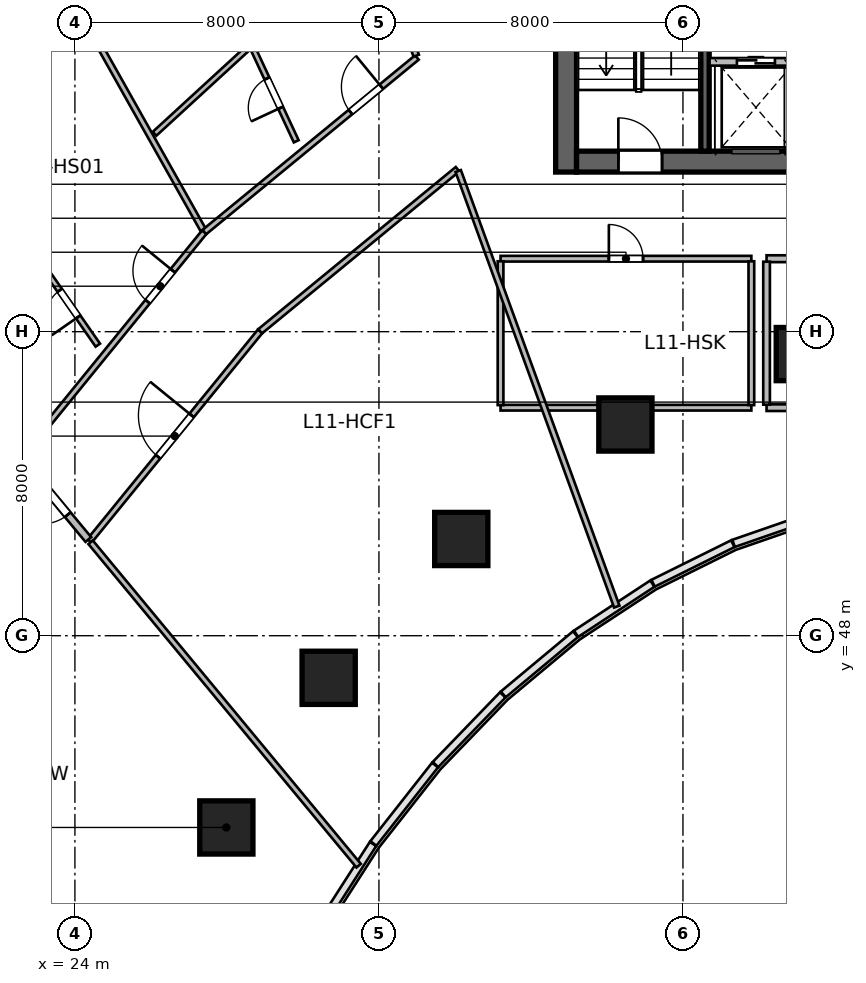
"""IFC4 building model, lengths in metres.
Left out: names, types, materials, properties, quantities, classifications, styles, units other than length and angle.
Written with IfcOpenShell. Run it as: python <this file> out.ifc"""

import sys

from ifc_helpers import new_model, si_unit, direction, frame, frame_2d, origin, origin_2d, place, context, subcontext, project, spatial, rectangle, circle, extrude, source, transform, mapped, element, fill, save


model = new_model("IFC4")
c1 = context("Model", 3, precision=1e-05, world=origin(), true_north=direction((0.0, 1.0)))
c2 = subcontext(c1, "Body", "Model", "MODEL_VIEW")
j1 = project(units=[si_unit("LENGTHUNIT", "METRE"), si_unit("PLANEANGLEUNIT", "RADIAN")], contexts=[c1])
p1 = place(None, origin())
s1 = spatial("IfcSite", under=j1, at=p1, CompositionType="ELEMENT")
p2 = place(p1, origin())
s2 = spatial("IfcBuilding", under=s1, at=p2, CompositionType="ELEMENT")
p3 = place(p2, frame((0.0, 0.0, 53.4)))
s3 = spatial("IfcBuildingStorey", under=s2, at=p3, CompositionType="ELEMENT", Elevation=53.4)
m1 = source(origin(), c2, "Body", "SweptSolid", [
    extrude(rectangle(XDim=12.0, YDim=0.55, at=frame_2d((6.0, 0.0))), origin(), (0.0, 0.0, 1.0), 3.6),
])
p4 = place(p3, frame((36.925, 60.2, 0.0), z_axis=(0.0, 0.0, 1.0), x_axis=(0.0, 1.0, 0.0)))
e1 = element("IfcWall", 1, at=p4, inside=s3, PredefinedType="SHEAR", context=c2, shape_type="MappedRepresentation", body=[
    mapped(m1, transform((0.0, 0.0, 0.0), scale=1.0)),
])
m2 = source(origin(), c2, "Body", "SweptSolid", [
    extrude(rectangle(XDim=21.6, YDim=0.55, at=frame_2d((10.8, 0.0))), origin(), (0.0, 0.0, 1.0), 3.6),
])
p5 = place(p3, frame((37.2, 60.475, 0.0), z_axis=(0.0, 0.0, 1.0), x_axis=(1.0, 0.0, 0.0)))
e2 = element("IfcWall", 2, at=p5, inside=s3, PredefinedType="SHEAR", context=c2, shape_type="MappedRepresentation", body=[
    mapped(m2, transform((0.0, 0.0, 0.0), scale=1.0)),
])
p6 = place(p5, frame((1.1, 0.0, 0.0)))
e3 = element("IfcOpeningElement", 3, at=p6, cuts=e2, PredefinedType="OPENING", context=c2, shape_type="SweptSolid", body=[
    extrude(rectangle(XDim=1.15, YDim=2.15, at=frame_2d((0.575, 1.075))), frame((0.0, 0.285, 0.0), z_axis=(0.0, -1.0, 0.0), x_axis=(1.0, 0.0, 0.0)), (0.0, 0.0, 1.0), 0.57),
])
p7 = place(p5, frame((19.5, 0.0, 0.0)))
e4 = element("IfcOpeningElement", 4, at=p7, cuts=e2, PredefinedType="OPENING", context=c2, shape_type="SweptSolid", body=[
    extrude(rectangle(XDim=0.9, YDim=2.1, at=frame_2d((0.45, 1.05))), frame((0.0, 0.285, 0.0), z_axis=(0.0, -1.0, 0.0), x_axis=(1.0, 0.0, 0.0)), (0.0, 0.0, 1.0), 0.57),
])
p8 = place(p5, frame((12.02, 0.0, 0.0)))
e5 = element("IfcOpeningElement", 5, at=p8, cuts=e2, PredefinedType="OPENING", context=c2, shape_type="SweptSolid", body=[
    extrude(rectangle(XDim=1.6, YDim=2.15, at=frame_2d((0.8, 1.075))), frame((0.0, 0.285, 0.0), z_axis=(0.0, -1.0, 0.0), x_axis=(1.0, 0.0, 0.0)), (0.0, 0.0, 1.0), 0.57),
])
m3 = source(origin(), c2, "Body", "SweptSolid", [
    extrude(rectangle(XDim=10.9, YDim=0.22, at=frame_2d((5.45, 0.0))), origin(), (0.0, 0.0, 1.0), 3.6),
])
p9 = place(p3, frame((40.58, 60.75, 0.0), z_axis=(0.0, 0.0, 1.0), x_axis=(0.0, 1.0, 0.0)))
e6 = element("IfcWall", 6, at=p9, inside=s3, PredefinedType="SHEAR", context=c2, shape_type="MappedRepresentation", body=[
    mapped(m3, transform((0.0, 0.0, 0.0), scale=1.0)),
])
m4 = source(origin(), c2, "Body", "SweptSolid", [
    extrude(circle(Radius=0.7, at=origin_2d()), origin(), (0.0, 0.0, 1.0), 3.6),
])
for number, where, z_axis, x_axis in (
    (7, (27.985, 42.955, 0.0), (0.0, 0.0, 1.0), (-0.691, 0.723, 0.0)),
    (8, (30.677, 46.892, 0.0), (0.0, 0.0, 1.0), (-0.571, 0.821, 0.0)),
    (9, (34.166, 50.545, 0.0), (0.0, 0.0, 1.0), (-0.436, 0.9, 0.0)),
    (10, (38.485, 53.558, 0.0), (0.0, 0.0, 1.0), (-0.289, 0.957, 0.0)),
    (11, (43.154, 55.411, 0.0), (0.0, 0.0, 1.0), (-0.143, 0.99, 0.0)),
):
    element("IfcColumn", number, at=place(p3, frame(where, z_axis=z_axis, x_axis=x_axis)), inside=s3, PredefinedType="COLUMN", context=c2, shape_type="MappedRepresentation", body=[
        mapped(m4, transform((0.0, 0.0, 0.0), scale=1.0)),
    ])
m5 = source(origin(), c2, "Body", "SweptSolid", [
    extrude(rectangle(XDim=8.02, YDim=0.2, at=frame_2d((4.01, 0.0))), origin(), (0.0, 0.0, 1.0), 3.36),
])
p10 = place(p3, frame((40.7, 63.1, 0.0), z_axis=(0.0, 0.0, 1.0), x_axis=(1.0, 0.0, 0.0)))
e12 = element("IfcWall", 12, at=p10, inside=s3, PredefinedType="SOLIDWALL", context=c2, shape_type="MappedRepresentation", body=[
    mapped(m5, transform((0.0, 0.0, 0.0), scale=1.0)),
])
p11 = place(p10, frame((0.72, 0.0, 0.0)))
e13 = element("IfcOpeningElement", 13, at=p11, cuts=e12, PredefinedType="OPENING", context=c2, shape_type="SweptSolid", body=[
    extrude(rectangle(XDim=1.0, YDim=2.15, at=frame_2d((0.5, 1.075))), frame((0.0, 0.11, 0.0), z_axis=(0.0, -1.0, 0.0), x_axis=(1.0, 0.0, 0.0)), (0.0, 0.0, 1.0), 0.22),
])
p12 = place(p10, frame((2.62, 0.0, 0.0)))
e14 = element("IfcOpeningElement", 14, at=p12, cuts=e12, PredefinedType="OPENING", context=c2, shape_type="SweptSolid", body=[
    extrude(rectangle(XDim=1.0, YDim=2.15, at=frame_2d((0.5, 1.075))), frame((0.0, 0.11, 0.0), z_axis=(0.0, -1.0, 0.0), x_axis=(1.0, 0.0, 0.0)), (0.0, 0.0, 1.0), 0.22),
])
p13 = place(p10, frame((4.55, 0.0, 0.0)))
e15 = element("IfcOpeningElement", 15, at=p13, cuts=e12, PredefinedType="OPENING", context=c2, shape_type="SweptSolid", body=[
    extrude(rectangle(XDim=1.0, YDim=2.15, at=frame_2d((0.5, 1.075))), frame((0.0, 0.11, 0.0), z_axis=(0.0, -1.0, 0.0), x_axis=(1.0, 0.0, 0.0)), (0.0, 0.0, 1.0), 0.22),
])
p14 = place(p10, frame((6.55, 0.0, 0.0)))
e16 = element("IfcOpeningElement", 16, at=p14, cuts=e12, PredefinedType="OPENING", context=c2, shape_type="SweptSolid", body=[
    extrude(rectangle(XDim=1.0, YDim=2.15, at=frame_2d((0.5, 1.075))), frame((0.0, 0.11, 0.0), z_axis=(0.0, -1.0, 0.0), x_axis=(1.0, 0.0, 0.0)), (0.0, 0.0, 1.0), 0.22),
])
m6 = source(origin(), c2, "Body", "SweptSolid", [
    extrude(rectangle(XDim=6.6, YDim=0.15, at=frame_2d((3.3, 0.0))), origin(), (0.0, 0.0, 1.0), 2.803),
])
p15 = place(p3, frame((35.2, 54.0, 0.0), z_axis=(0.0, 0.0, 1.0), x_axis=(1.0, 0.0, 0.0)))
e17 = element("IfcWall", 17, at=p15, inside=s3, PredefinedType="PARTITIONING", context=c2, shape_type="MappedRepresentation", body=[
    mapped(m6, transform((0.0, 0.0, 0.0), scale=1.0)),
])
m7 = source(origin(), c2, "Body", "SweptSolid", [
    extrude(rectangle(XDim=6.6, YDim=0.15, at=frame_2d((3.3, 0.0))), origin(), (0.0, 0.0, 1.0), 3.36),
])
p16 = place(p3, frame((35.2, 57.92, 0.0), z_axis=(0.0, 0.0, 1.0), x_axis=(1.0, 0.0, 0.0)))
e18 = element("IfcWall", 18, at=p16, inside=s3, PredefinedType="PARTITIONING", context=c2, shape_type="MappedRepresentation", body=[
    mapped(m7, transform((0.0, 0.0, 0.0), scale=1.0)),
])
p17 = place(p16, frame((2.85, 0.0, 0.0)))
e19 = element("IfcOpeningElement", 19, at=p17, cuts=e18, PredefinedType="OPENING", context=c2, shape_type="SweptSolid", body=[
    extrude(rectangle(XDim=0.9, YDim=2.1, at=frame_2d((0.45, 1.05))), frame((0.0, 0.085, 0.0), z_axis=(0.0, -1.0, 0.0), x_axis=(1.0, 0.0, 0.0)), (0.0, 0.0, 1.0), 0.17),
])
m8 = source(origin(), c2, "Body", "SweptSolid", [
    extrude(rectangle(XDim=3.785, YDim=0.15, at=frame_2d((1.893, 0.0))), origin(), (0.0, 0.0, 1.0), 3.36),
])
for number, where, z_axis, x_axis in (
    (20, (35.2, 54.067, 0.0), (0.0, 0.0, 1.0), (0.0, 1.0, 0.0)),
    (21, (41.8, 54.067, 0.0), (0.0, 0.0, 1.0), (0.0, 1.0, 0.0)),
):
    element("IfcWall", number, at=place(p3, frame(where, z_axis=z_axis, x_axis=x_axis)), inside=s3, PredefinedType="PARTITIONING", context=c2, shape_type="MappedRepresentation", body=[
        mapped(m8, transform((0.0, 0.0, 0.0), scale=1.0)),
    ])
m9 = source(origin(), c2, "Body", "SweptSolid", [
    extrude(rectangle(XDim=4.176, YDim=0.175, at=frame_2d((2.088, 0.0))), origin(), (0.0, 0.0, 1.0), 3.36),
])
p18 = place(p3, frame((42.2, 54.0, 0.0), z_axis=(0.0, 0.0, 1.0), x_axis=(1.0, 0.0, 0.0)))
e22 = element("IfcWall", 22, at=p18, inside=s3, PredefinedType="PARTITIONING", context=c2, shape_type="MappedRepresentation", body=[
    mapped(m9, transform((0.0, 0.0, 0.0), scale=1.0)),
])
m10 = source(origin(), c2, "Body", "SweptSolid", [
    extrude(rectangle(XDim=4.176, YDim=0.18, at=frame_2d((2.088, 0.0))), origin(), (0.0, 0.0, 1.0), 3.36),
])
p19 = place(p3, frame((42.2, 57.92, 0.0), z_axis=(0.0, 0.0, 1.0), x_axis=(1.0, 0.0, 0.0)))
e23 = element("IfcWall", 23, at=p19, inside=s3, PredefinedType="PLUMBINGWALL", context=c2, shape_type="MappedRepresentation", body=[
    mapped(m10, transform((0.0, 0.0, 0.0), scale=1.0)),
])
p20 = place(p19, frame((1.638, 0.0, 0.0)))
e24 = element("IfcOpeningElement", 24, at=p20, cuts=e23, PredefinedType="OPENING", context=c2, shape_type="SweptSolid", body=[
    extrude(rectangle(XDim=0.9, YDim=2.08, at=frame_2d((0.45, 1.04))), frame((0.0, 0.1, 0.0), z_axis=(0.0, -1.0, 0.0), x_axis=(1.0, 0.0, 0.0)), (0.0, 0.0, 1.0), 0.2),
])
m11 = source(origin(), c2, "Body", "SweptSolid", [
    extrude(rectangle(XDim=3.763, YDim=0.175, at=frame_2d((1.881, 0.0))), origin(), (0.0, 0.0, 1.0), 3.36),
])
p21 = place(p3, frame((42.2, 54.079, 0.0), z_axis=(0.0, 0.0, 1.0), x_axis=(0.0, 1.0, 0.0)))
e25 = element("IfcWall", 25, at=p21, inside=s3, PredefinedType="PARTITIONING", context=c2, shape_type="MappedRepresentation", body=[
    mapped(m11, transform((0.0, 0.0, 0.0), scale=1.0)),
])
m12 = source(origin(), c2, "Body", "SweptSolid", [
    extrude(rectangle(XDim=7.659, YDim=0.15, at=frame_2d((3.829, 0.0))), origin(), (0.0, 0.0, 1.0), 3.36),
])
p22 = place(p3, frame((22.57, 52.683, 0.0), z_axis=(0.0, 0.0, 1.0), x_axis=(0.631489868862, 0.775384127723, 0.0)))
e26 = element("IfcWall", 26, at=p22, inside=s3, PredefinedType="PARTITIONING", context=c2, shape_type="MappedRepresentation", body=[
    mapped(m12, transform((0.0, 0.0, 0.0), scale=1.0)),
])
p23 = place(p22, frame((5.295, 0.0, 0.0)))
e27 = element("IfcOpeningElement", 27, at=p23, cuts=e26, PredefinedType="OPENING", context=c2, shape_type="SweptSolid", body=[
    extrude(rectangle(XDim=1.05, YDim=2.15, at=frame_2d((0.525, 1.075))), frame((0.0, 0.085, 0.0), z_axis=(0.0, -1.0, 0.0), x_axis=(1.0, 0.0, 0.0)), (0.0, 0.0, 1.0), 0.17),
])
m13 = source(origin(), c2, "Body", "SweptSolid", [
    extrude(rectangle(XDim=11.573, YDim=0.15, at=frame_2d((5.786, 0.0))), origin(), (0.0, 0.0, 1.0), 3.36),
])
p24 = place(p3, frame((27.382, 58.664, 0.0), z_axis=(0.0, 0.0, 1.0), x_axis=(-0.490161073951, 0.871631872744, 0.0)))
e28 = element("IfcWall", 28, at=p24, inside=s3, PredefinedType="PARTITIONING", context=c2, shape_type="MappedRepresentation", body=[
    mapped(m13, transform((0.0, 0.0, 0.0), scale=1.0)),
])
m14 = source(origin(), c2, "Body", "SweptSolid", [
    extrude(rectangle(XDim=2.663, YDim=0.14, at=frame_2d((1.332, 0.0))), origin(), (0.0, 0.0, 1.0), 2.644),
])
p25 = place(p3, frame((24.603, 55.645, 0.0), z_axis=(0.0, 0.0, 1.0), x_axis=(-0.570905989724, 0.821015438891, 0.0)))
e29 = element("IfcWall", 29, at=p25, inside=s3, PredefinedType="PARTITIONING", context=c2, shape_type="MappedRepresentation", body=[
    mapped(m14, transform((0.0, 0.0, 0.0), scale=1.0)),
])
p26 = place(p25, frame((0.906, 0.0, 0.0)))
e30 = element("IfcOpeningElement", 30, at=p26, cuts=e29, PredefinedType="OPENING", context=c2, shape_type="SweptSolid", body=[
    extrude(rectangle(XDim=0.85, YDim=2.05, at=frame_2d((0.425, 1.025))), frame((0.0, 0.08, 0.0), z_axis=(0.0, -1.0, 0.0), x_axis=(1.0, 0.0, 0.0)), (0.0, 0.0, 1.0), 0.16),
])
m15 = source(origin(), c2, "Body", "SweptSolid", [
    extrude(rectangle(XDim=7.237, YDim=0.15, at=frame_2d((3.618, 0.0))), origin(), (0.0, 0.0, 1.0), 3.36),
])
p27 = place(p3, frame((27.406, 58.621, 0.0), z_axis=(0.0, 0.0, 1.0), x_axis=(0.772813707793, 0.634632943557, 0.0)))
e31 = element("IfcWall", 31, at=p27, inside=s3, PredefinedType="PARTITIONING", context=c2, shape_type="MappedRepresentation", body=[
    mapped(m15, transform((0.0, 0.0, 0.0), scale=1.0)),
])
p28 = place(p27, frame((4.975, 0.0, 0.0)))
e32 = element("IfcOpeningElement", 32, at=p28, cuts=e31, PredefinedType="OPENING", context=c2, shape_type="SweptSolid", body=[
    extrude(rectangle(XDim=1.05, YDim=2.15, at=frame_2d((0.525, 1.075))), frame((0.0, 0.085, 0.0), z_axis=(0.0, -1.0, 0.0), x_axis=(1.0, 0.0, 0.0)), (0.0, 0.0, 1.0), 0.17),
])
m16 = source(origin(), c2, "Body", "SweptSolid", [
    extrude(rectangle(XDim=12.088, YDim=0.15, at=frame_2d((6.044, 0.0))), origin(), (0.0, 0.0, 1.0), 3.36),
])
p29 = place(p3, frame((32.981, 63.262, 0.0), z_axis=(0.0, 0.0, 1.0), x_axis=(-0.34203007529, 0.939689005787, 0.0)))
e33 = element("IfcWall", 33, at=p29, inside=s3, PredefinedType="PARTITIONING", context=c2, shape_type="MappedRepresentation", body=[
    mapped(m16, transform((0.0, 0.0, 0.0), scale=1.0)),
])
m17 = source(origin(), c2, "Body", "SweptSolid", [
    extrude(rectangle(XDim=3.456, YDim=0.14, at=frame_2d((1.728, 0.0))), origin(), (0.0, 0.0, 1.0), 3.36),
])
p30 = place(p3, frame((26.095, 61.207, 0.0), z_axis=(0.0, 0.0, 1.0), x_axis=(0.736860870293, 0.676044420013, 0.0)))
e34 = element("IfcWall", 34, at=p30, inside=s3, PredefinedType="PARTITIONING", context=c2, shape_type="MappedRepresentation", body=[
    mapped(m17, transform((0.0, 0.0, 0.0), scale=1.0)),
])
m18 = source(origin(), c2, "Body", "SweptSolid", [
    extrude(rectangle(XDim=2.796, YDim=0.14, at=frame_2d((1.398, 0.0))), origin(), (0.0, 0.0, 1.0), 3.36),
])
p31 = place(p3, frame((29.823, 61.009, 0.0), z_axis=(0.0, 0.0, 1.0), x_axis=(-0.422316594955, 0.906448395456, 0.0)))
e35 = element("IfcWall", 35, at=p31, inside=s3, PredefinedType="PARTITIONING", context=c2, shape_type="MappedRepresentation", body=[
    mapped(m18, transform((0.0, 0.0, 0.0), scale=1.0)),
])
p32 = place(p31, frame((0.973, 0.0, 0.0)))
e36 = element("IfcOpeningElement", 36, at=p32, cuts=e35, PredefinedType="OPENING", context=c2, shape_type="SweptSolid", body=[
    extrude(rectangle(XDim=0.85, YDim=2.05, at=frame_2d((0.425, 1.025))), frame((0.0, 0.08, 0.0), z_axis=(0.0, -1.0, 0.0), x_axis=(1.0, 0.0, 0.0)), (0.0, 0.0, 1.0), 0.16),
])
m19 = source(origin(), c2, "Body", "SweptSolid", [
    extrude(rectangle(XDim=7.113, YDim=0.15, at=frame_2d((3.556, 0.0))), origin(), (0.0, 0.0, 1.0), 3.36),
])
p33 = place(p3, frame((24.383, 50.495, 0.0), z_axis=(0.0, 0.0, 1.0), x_axis=(0.63149032532, 0.775383755974, 0.0)))
e37 = element("IfcWall", 37, at=p33, inside=s3, PredefinedType="PARTITIONING", context=c2, shape_type="MappedRepresentation", body=[
    mapped(m19, transform((0.0, 0.0, 0.0), scale=1.0)),
])
p34 = place(p33, frame((2.856, 0.0, 0.0)))
e38 = element("IfcOpeningElement", 38, at=p34, cuts=e37, PredefinedType="OPENING", context=c2, shape_type="SweptSolid", body=[
    extrude(rectangle(XDim=1.4, YDim=2.15, at=frame_2d((0.7, 1.075))), frame((0.0, 0.085, 0.0), z_axis=(0.0, -1.0, 0.0), x_axis=(1.0, 0.0, 0.0)), (0.0, 0.0, 1.0), 0.17),
])
m20 = source(origin(), c2, "Body", "SweptSolid", [
    extrude(rectangle(XDim=6.721, YDim=0.15, at=frame_2d((3.361, 0.0))), origin(), (0.0, 0.0, 1.0), 3.36),
])
p35 = place(p3, frame((28.874, 56.01, 0.0), z_axis=(0.0, 0.0, 1.0), x_axis=(0.772828051199, 0.63461547671, 0.0)))
e39 = element("IfcWall", 39, at=p35, inside=s3, PredefinedType="PARTITIONING", context=c2, shape_type="MappedRepresentation", body=[
    mapped(m20, transform((0.0, 0.0, 0.0), scale=1.0)),
])
m21 = source(origin(), c2, "Body", "SweptSolid", [
    extrude(rectangle(XDim=11.053, YDim=0.15, at=frame_2d((5.527, 0.0))), origin(), (0.0, 0.0, 1.0), 3.36),
])
p36 = place(p3, frame((31.466, 41.949, 0.0), z_axis=(0.0, 0.0, 1.0), x_axis=(-0.638131235571, 0.769927611005, 0.0)))
e40 = element("IfcWall", 40, at=p36, inside=s3, PredefinedType="PARTITIONING", context=c2, shape_type="MappedRepresentation", body=[
    mapped(m21, transform((0.0, 0.0, 0.0), scale=1.0)),
])
m22 = source(origin(), c2, "Body", "SweptSolid", [
    extrude(rectangle(XDim=12.196, YDim=0.15, at=frame_2d((6.098, 0.0))), origin(), (0.0, 0.0, 1.0), 3.36),
])
p37 = place(p3, frame((38.258, 48.766, 0.0), z_axis=(0.0, 0.0, 1.0), x_axis=(-0.342022711534, 0.939691686031, 0.0)))
e41 = element("IfcWall", 41, at=p37, inside=s3, PredefinedType="PARTITIONING", context=c2, shape_type="MappedRepresentation", body=[
    mapped(m22, transform((0.0, 0.0, 0.0), scale=1.0)),
])
m23 = source(origin(), c2, "Body", "SweptSolid", [
    extrude(rectangle(XDim=2.748, YDim=0.195, at=frame_2d((1.374, 0.0))), origin(), (0.0, 0.0, 1.0), 3.36),
])
p38 = place(p3, frame((24.353, 50.531, 0.0), z_axis=(0.0, 0.0, 1.0), x_axis=(-0.638111168284, 0.769944242729, 0.0)))
e42 = element("IfcWall", 42, at=p38, inside=s3, PredefinedType="PARTITIONING", context=c2, shape_type="MappedRepresentation", body=[
    mapped(m23, transform((0.0, 0.0, 0.0), scale=1.0)),
])
p39 = place(p38, frame((0.849, 0.0, 0.0)))
e43 = element("IfcOpeningElement", 43, at=p39, cuts=e42, PredefinedType="OPENING", context=c2, shape_type="SweptSolid", body=[
    extrude(rectangle(XDim=1.05, YDim=2.15, at=frame_2d((0.525, 1.075))), frame((0.0, 0.107, 0.0), z_axis=(0.0, -1.0, 0.0), x_axis=(1.0, 0.0, 0.0)), (0.0, 0.0, 1.0), 0.215),
])
m24 = source(origin(), c2, "Body", "SweptSolid", [
    extrude(rectangle(XDim=1.15, YDim=2.15, at=frame_2d((0.575, 1.075))), frame((0.0, 0.025, 0.0), z_axis=(0.0, -1.0, 0.0), x_axis=(1.0, 0.0, 0.0)), (0.0, 0.0, 1.0), 0.05),
])
p40 = place(p6, origin())
e44 = element("IfcDoor", 44, at=p40, inside=s3, OperationType="SINGLE_SWING_LEFT", PredefinedType="DOOR", context=c2, shape_type="MappedRepresentation", body=[
    mapped(m24, transform((0.0, 0.0, 0.0), scale=1.0)),
])
fill(e3, e44)
m25 = source(origin(), c2, "Body", "SweptSolid", [
    extrude(rectangle(XDim=1.0, YDim=2.15, at=frame_2d((0.5, 1.075))), frame((0.0, 0.025, 0.0), z_axis=(0.0, -1.0, 0.0), x_axis=(1.0, 0.0, 0.0)), (0.0, 0.0, 1.0), 0.05),
])
p41 = place(p11, origin())
e45 = element("IfcDoor", 45, at=p41, inside=s3, OperationType="DOUBLE_DOOR_SLIDING", PredefinedType="DOOR", context=c2, shape_type="MappedRepresentation", body=[
    mapped(m25, transform((0.0, 0.0, 0.0), scale=1.0)),
])
fill(e13, e45)
m26 = source(origin(), c2, "Body", "SweptSolid", [
    extrude(rectangle(XDim=0.9, YDim=2.1, at=frame_2d((0.45, 1.05))), frame((0.0, 0.025, 0.0), z_axis=(0.0, -1.0, 0.0), x_axis=(1.0, 0.0, 0.0)), (0.0, 0.0, 1.0), 0.05),
])
p42 = place(p17, origin())
e46 = element("IfcDoor", 46, at=p42, inside=s3, OperationType="SINGLE_SWING_LEFT", PredefinedType="DOOR", context=c2, shape_type="MappedRepresentation", body=[
    mapped(m26, transform((0.0, 0.0, 0.0), scale=1.0)),
])
fill(e19, e46)
m27 = source(origin(), c2, "Body", "SweptSolid", [
    extrude(rectangle(XDim=1.05, YDim=2.15, at=frame_2d((0.525, 1.075))), frame((0.0, 0.025, 0.0), z_axis=(0.0, -1.0, 0.0), x_axis=(1.0, 0.0, 0.0)), (0.0, 0.0, 1.0), 0.05),
])
p43 = place(p23, origin())
e47 = element("IfcDoor", 47, at=p43, inside=s3, OperationType="SINGLE_SWING_RIGHT", PredefinedType="DOOR", context=c2, shape_type="MappedRepresentation", body=[
    mapped(m27, transform((0.0, 0.0, 0.0), scale=1.0)),
])
fill(e27, e47)
m28 = source(origin(), c2, "Body", "SweptSolid", [
    extrude(rectangle(XDim=0.85, YDim=2.05, at=frame_2d((0.425, 1.025))), frame((0.0, 0.025, 0.0), z_axis=(0.0, -1.0, 0.0), x_axis=(1.0, 0.0, 0.0)), (0.0, 0.0, 1.0), 0.05),
])
p44 = place(p26, origin())
e48 = element("IfcDoor", 48, at=p44, inside=s3, OperationType="SINGLE_SWING_LEFT", PredefinedType="DOOR", context=c2, shape_type="MappedRepresentation", body=[
    mapped(m28, transform((0.0, 0.0, 0.0), scale=1.0)),
])
fill(e30, e48)
p45 = place(p28, origin())
e49 = element("IfcDoor", 49, at=p45, inside=s3, OperationType="SINGLE_SWING_RIGHT", PredefinedType="DOOR", context=c2, shape_type="MappedRepresentation", body=[
    mapped(m27, transform((0.0, 0.0, 0.0), scale=1.0)),
])
fill(e32, e49)
p46 = place(p32, origin())
e50 = element("IfcDoor", 50, at=p46, inside=s3, OperationType="SINGLE_SWING_LEFT", PredefinedType="DOOR", context=c2, shape_type="MappedRepresentation", body=[
    mapped(m28, transform((0.0, 0.0, 0.0), scale=1.0)),
])
fill(e36, e50)
m29 = source(origin(), c2, "Body", "SweptSolid", [
    extrude(rectangle(XDim=1.4, YDim=2.15, at=frame_2d((0.7, 1.075))), frame((0.0, 0.025, 0.0), z_axis=(0.0, -1.0, 0.0), x_axis=(1.0, 0.0, 0.0)), (0.0, 0.0, 1.0), 0.05),
])
p47 = place(p34, origin())
e51 = element("IfcDoor", 51, at=p47, inside=s3, OperationType="SINGLE_SWING_RIGHT", PredefinedType="DOOR", context=c2, shape_type="MappedRepresentation", body=[
    mapped(m29, transform((0.0, 0.0, 0.0), scale=1.0)),
])
fill(e38, e51)
p48 = place(p39, origin())
e52 = element("IfcDoor", 52, at=p48, inside=s3, OperationType="SINGLE_SWING_RIGHT", PredefinedType="DOOR", context=c2, shape_type="MappedRepresentation", body=[
    mapped(m27, transform((0.0, 0.0, 0.0), scale=1.0)),
])
fill(e43, e52)
save(model, sys.argv[1])
